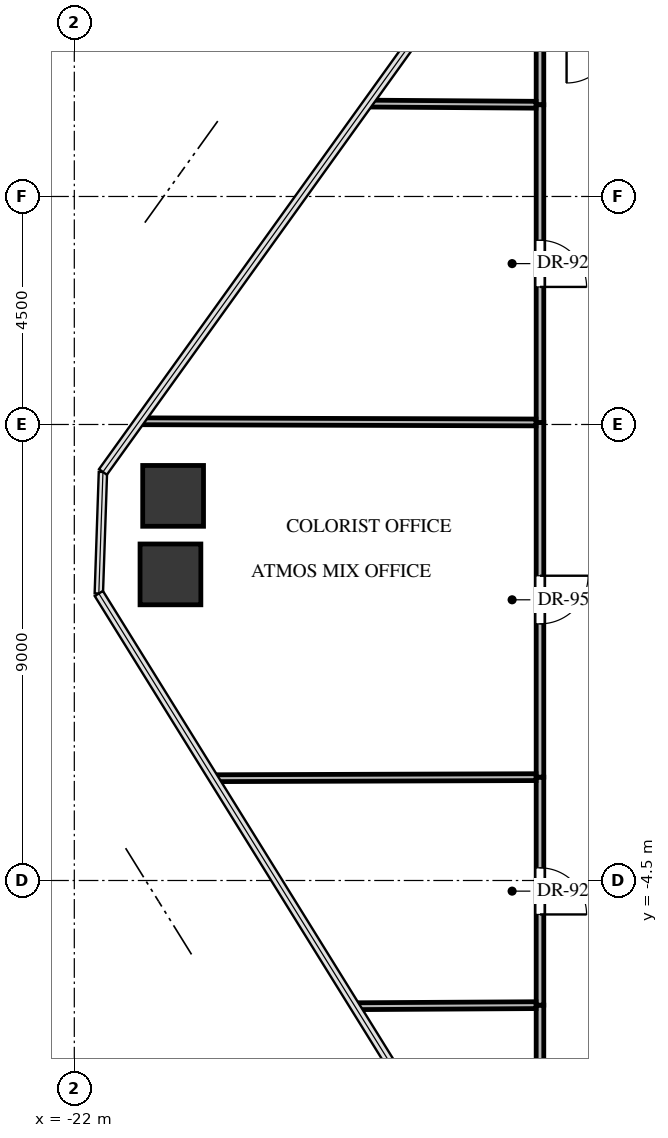
"""IFC4 building model, lengths in metres.
Left out: names, types, materials, properties, quantities, classifications, styles, units other than length and angle.
Written with IfcOpenShell. Run it as: python <this file> out.ifc"""

import sys

from ifc_helpers import new_model, si_unit, direction, frame, frame_2d, origin, origin_2d, place, context, subcontext, project, spatial, rectangle, extrude, source, transform, mapped, element, fill, save


model = new_model("IFC4")
c1 = context("Model", 3, precision=1e-05, world=origin(), true_north=direction((0.0, 1.0)))
c2 = subcontext(c1, "Body", "Model", "MODEL_VIEW")
j1 = project(units=[si_unit("LENGTHUNIT", "METRE"), si_unit("PLANEANGLEUNIT", "RADIAN")], contexts=[c1])
p1 = place(None, origin())
s1 = spatial("IfcSite", under=j1, at=p1, CompositionType="ELEMENT")
p2 = place(p1, origin())
s2 = spatial("IfcBuilding", under=s1, at=p2, CompositionType="ELEMENT")
p3 = place(p2, frame((0.0, 0.0, 110.7)))
s3 = spatial("IfcBuildingStorey", under=s2, at=p3, CompositionType="ELEMENT", Elevation=110.7)
m1 = source(origin(), c2, "Body", "SweptSolid", [
    extrude(rectangle(XDim=1.2, YDim=1.2, at=origin_2d()), origin(), (0.0, 0.0, 1.0), 3.3),
])
for number, where, z_axis, x_axis in (
    (1, (-20.103, 1.542, -0.24), (0.0, 0.0, 1.0), (1.0, 0.0, 0.0)),
    (2, (-20.05, 3.091, -0.24), (0.0, 0.0, 1.0), (1.0, 0.0, 0.0)),
):
    element("IfcColumn", number, at=place(p3, frame(where, z_axis=z_axis, x_axis=x_axis)), inside=s3, PredefinedType="COLUMN", context=c2, shape_type="MappedRepresentation", body=[
        mapped(m1, transform((0.0, 0.0, 0.0), x_axis=(1.0, 0.0, 0.0), y_axis=(0.0, 1.0, 0.0), z_axis=(0.0, 0.0, 1.0), scale=1.0)),
    ])
p4 = place(p3, frame((-12.81, 12.081, 0.0), z_axis=(0.0, 0.0, 1.0), x_axis=(0.0, -1.0, 0.0)))
e3 = element("IfcWall", 3, at=p4, inside=s3, PredefinedType="PARTITIONING", context=c2, shape_type="SweptSolid", body=[
    extrude(rectangle(XDim=1.271, YDim=0.15, at=frame_2d((0.635, 0.0))), origin(), (0.0, 0.0, 1.0), 3.045),
])
p5 = place(p3, frame((-12.81, -6.96, 0.0), z_axis=(0.0, 0.0, 1.0), x_axis=(0.0, -1.0, 0.0)))
e4 = element("IfcWall", 4, at=p5, inside=s3, PredefinedType="PARTITIONING", context=c2, shape_type="SweptSolid", body=[
    extrude(rectangle(XDim=3.93, YDim=0.15, at=frame_2d((1.965, 0.0))), origin(), (0.0, 0.0, 1.0), 2.38),
])
p6 = place(p5, frame((1.49, 0.0, 0.0)))
e5 = element("IfcOpeningElement", 5, at=p6, cuts=e4, PredefinedType="OPENING", context=c2, shape_type="SweptSolid", body=[
    extrude(rectangle(XDim=0.95, YDim=2.1, at=frame_2d((0.475, 1.05))), frame((0.0, 0.085, 0.0), z_axis=(0.0, -1.0, 0.0), x_axis=(1.0, 0.0, 0.0)), (0.0, 0.0, 1.0), 0.17),
])
p7 = place(p3, frame((-12.81, -2.46, 0.0), z_axis=(0.0, 0.0, 1.0), x_axis=(0.0, -1.0, 0.0)))
e6 = element("IfcWall", 6, at=p7, inside=s3, PredefinedType="PARTITIONING", context=c2, shape_type="SweptSolid", body=[
    extrude(rectangle(XDim=4.5, YDim=0.15, at=frame_2d((2.25, 0.0))), origin(), (0.0, 0.0, 1.0), 3.045),
])
p8 = place(p7, frame((1.79, 0.0, 0.0)))
e7 = element("IfcOpeningElement", 7, at=p8, cuts=e6, PredefinedType="OPENING", context=c2, shape_type="SweptSolid", body=[
    extrude(rectangle(XDim=0.92, YDim=2.1, at=frame_2d((0.46, 1.05))), frame((0.0, 0.085, 0.0), z_axis=(0.0, -1.0, 0.0), x_axis=(1.0, 0.0, 0.0)), (0.0, 0.0, 1.0), 0.17),
])
p9 = place(p3, frame((-12.81, 4.54, 0.0), z_axis=(0.0, 0.0, 1.0), x_axis=(0.0, -1.0, 0.0)))
e8 = element("IfcWall", 8, at=p9, inside=s3, PredefinedType="PARTITIONING", context=c2, shape_type="SweptSolid", body=[
    extrude(rectangle(XDim=7.0, YDim=0.15, at=frame_2d((3.5, 0.0))), origin(), (0.0, 0.0, 1.0), 2.212),
])
p10 = place(p9, frame((3.025, 0.0, 0.0)))
e9 = element("IfcOpeningElement", 9, at=p10, cuts=e8, PredefinedType="OPENING", context=c2, shape_type="SweptSolid", body=[
    extrude(rectangle(XDim=0.95, YDim=2.1, at=frame_2d((0.475, 1.05))), frame((0.0, 0.085, 0.0), z_axis=(0.0, -1.0, 0.0), x_axis=(1.0, 0.0, 0.0)), (0.0, 0.0, 1.0), 0.17),
])
p11 = place(p3, frame((-12.81, 10.81, 0.0), z_axis=(0.0, 0.0, 1.0), x_axis=(0.0, -1.0, 0.0)))
e10 = element("IfcWall", 10, at=p11, inside=s3, PredefinedType="PARTITIONING", context=c2, shape_type="SweptSolid", body=[
    extrude(rectangle(XDim=6.27, YDim=0.15, at=frame_2d((3.135, 0.0))), origin(), (0.0, 0.0, 1.0), 3.045),
])
p12 = place(p11, frame((2.675, 0.0, 0.0)))
e11 = element("IfcOpeningElement", 11, at=p12, cuts=e10, PredefinedType="OPENING", context=c2, shape_type="SweptSolid", body=[
    extrude(rectangle(XDim=0.92, YDim=2.1, at=frame_2d((0.46, 1.05))), frame((0.0, 0.085, 0.0), z_axis=(0.0, -1.0, 0.0), x_axis=(1.0, 0.0, 0.0)), (0.0, 0.0, 1.0), 0.17),
])
p13 = place(p3, frame((-12.889, 10.811, 0.0), z_axis=(0.0, 0.0, 1.0), x_axis=(-0.999976657862, 0.006832549348, 0.0)))
e12 = element("IfcWall", 12, at=p13, inside=s3, PredefinedType="PARTITIONING", context=c2, shape_type="SweptSolid", body=[
    extrude(rectangle(XDim=3.323, YDim=0.135, at=frame_2d((1.662, 0.0))), origin(), (0.0, 0.0, 1.0), 2.38),
])
p14 = place(p3, frame((-16.464, -6.981, 0.0), z_axis=(0.0, 0.0, 1.0), x_axis=(0.99998315245, 0.005804723619, 0.0)))
e13 = element("IfcWall", 13, at=p14, inside=s3, PredefinedType="PARTITIONING", context=c2, shape_type="SweptSolid", body=[
    extrude(rectangle(XDim=3.575, YDim=0.135, at=frame_2d((1.788, 0.0))), origin(), (0.0, 0.0, 1.0), 2.38),
])
p15 = place(p3, frame((-19.255, -2.481, 0.0), z_axis=(0.0, 0.0, 1.0), x_axis=(0.999994561471, 0.003298033912, 0.0)))
e14 = element("IfcWall", 14, at=p15, inside=s3, PredefinedType="PARTITIONING", context=c2, shape_type="SweptSolid", body=[
    extrude(rectangle(XDim=6.366, YDim=0.135, at=frame_2d((3.183, 0.0))), origin(), (0.0, 0.0, 1.0), 2.38),
])
p16 = place(p3, frame((-20.716, 4.563, 0.0), z_axis=(0.0, 0.0, 1.0), x_axis=(0.999995701977, -0.002931898443, 0.0)))
e15 = element("IfcWall", 15, at=p16, inside=s3, PredefinedType="PARTITIONING", context=c2, shape_type="SweptSolid", body=[
    extrude(rectangle(XDim=7.827, YDim=0.135, at=frame_2d((3.914, 0.0))), origin(), (0.0, 0.0, 1.0), 2.38),
])
m2 = source(origin(), c2, "Body", "SweptSolid", [
    extrude(rectangle(XDim=0.92, YDim=2.1, at=frame_2d((0.46, 1.05))), frame((0.0, 0.025, 0.0), z_axis=(0.0, -1.0, 0.0), x_axis=(1.0, 0.0, 0.0)), (0.0, 0.0, 1.0), 0.05),
])
p17 = place(p8, origin())
e16 = element("IfcDoor", 16, at=p17, inside=s3, OperationType="SINGLE_SWING_RIGHT", PredefinedType="DOOR", context=c2, shape_type="MappedRepresentation", body=[
    mapped(m2, transform((0.0, 0.0, 0.0), x_axis=(1.0, 0.0, 0.0), y_axis=(0.0, 1.0, 0.0), z_axis=(0.0, 0.0, 1.0), scale=1.0)),
])
fill(e7, e16)
m3 = source(origin(), c2, "Body", "SweptSolid", [
    extrude(rectangle(XDim=0.95, YDim=2.1, at=frame_2d((0.475, 1.05))), frame((0.0, 0.025, 0.0), z_axis=(0.0, -1.0, 0.0), x_axis=(1.0, 0.0, 0.0)), (0.0, 0.0, 1.0), 0.05),
])
p18 = place(p10, origin())
e17 = element("IfcDoor", 17, at=p18, inside=s3, OperationType="SINGLE_SWING_LEFT", PredefinedType="DOOR", context=c2, shape_type="MappedRepresentation", body=[
    mapped(m3, transform((0.0, 0.0, 0.0), x_axis=(1.0, 0.0, 0.0), y_axis=(0.0, 1.0, 0.0), z_axis=(0.0, 0.0, 1.0), scale=1.0)),
])
fill(e9, e17)
p19 = place(p12, origin())
e18 = element("IfcDoor", 18, at=p19, inside=s3, OperationType="SINGLE_SWING_RIGHT", PredefinedType="DOOR", context=c2, shape_type="MappedRepresentation", body=[
    mapped(m2, transform((0.0, 0.0, 0.0), x_axis=(1.0, 0.0, 0.0), y_axis=(0.0, 1.0, 0.0), z_axis=(0.0, 0.0, 1.0), scale=1.0)),
])
fill(e11, e18)
save(model, sys.argv[1])
